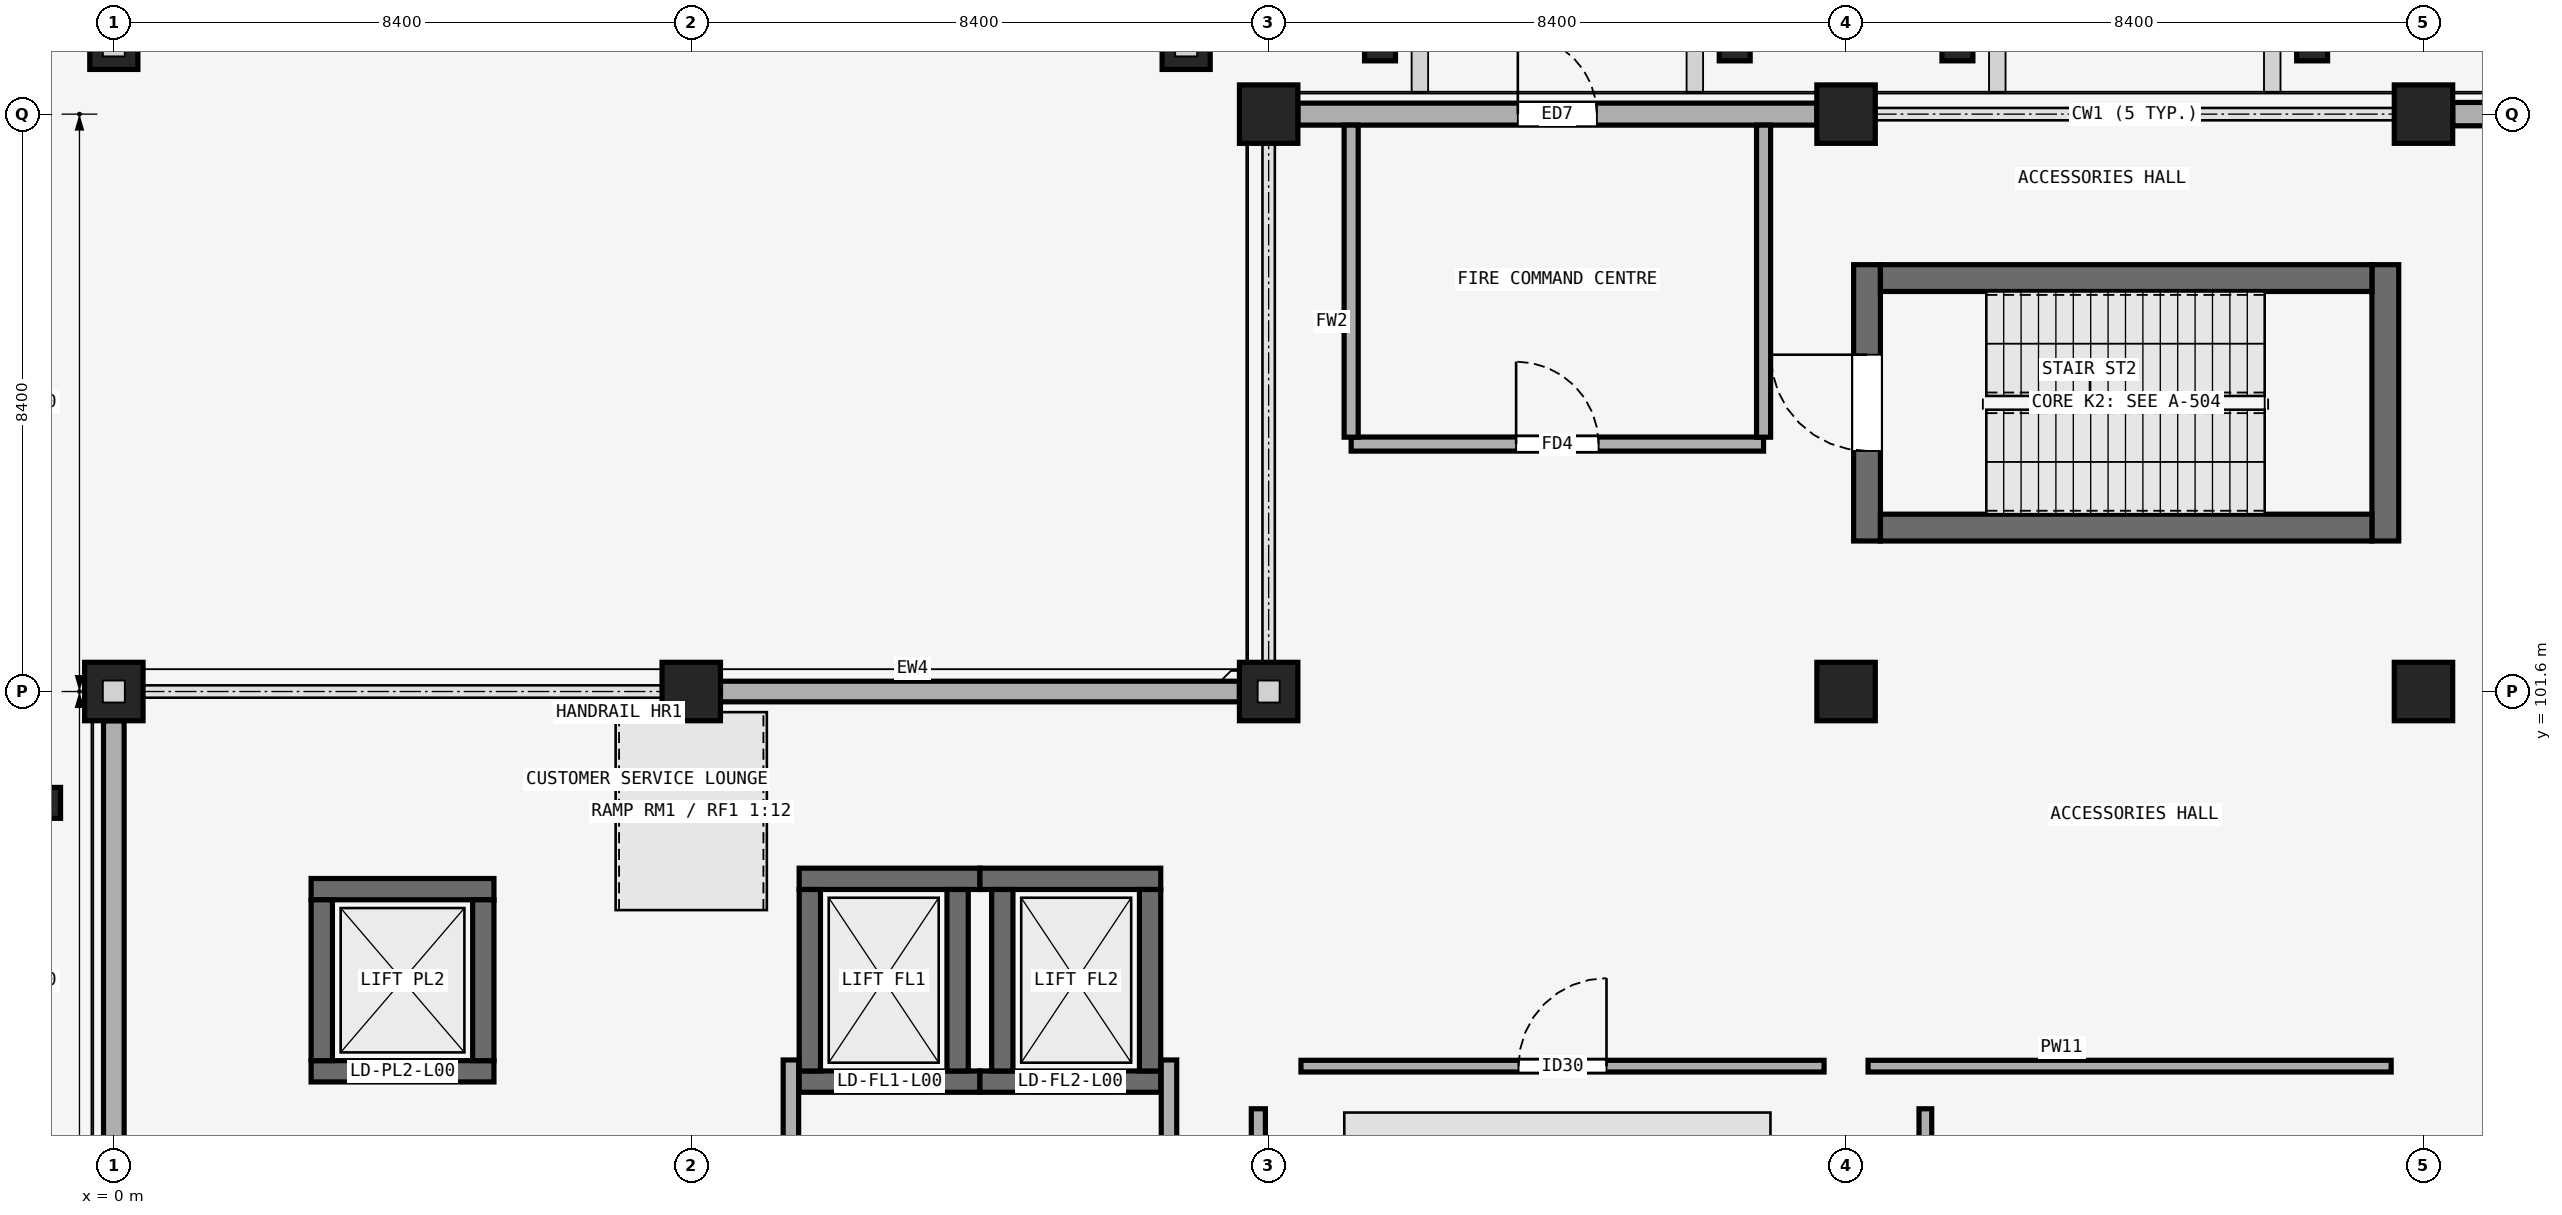
"""IFC4 building model, lengths in metres.
Left out: names, types, materials, properties, quantities, classifications, styles, units other than length and angle.
Written with IfcOpenShell. Run it as: python <this file> out.ifc"""

import sys

from ifc_helpers import new_model, si_unit, direction, frame, frame_2d, origin, origin_2d, place, context, subcontext, project, spatial, rectangle, circle, extrude, element, fill, save


model = new_model("IFC4")
c1 = context("Model", 3, precision=1e-05, world=origin(), true_north=direction((0.0, 1.0)))
c2 = subcontext(c1, "Body", "Model", "MODEL_VIEW")
j1 = project(units=[si_unit("LENGTHUNIT", "METRE"), si_unit("PLANEANGLEUNIT", "RADIAN")], contexts=[c1])
p1 = place(None, origin())
s1 = spatial("IfcSite", under=j1, at=p1, CompositionType="ELEMENT")
p2 = place(p1, origin())
s2 = spatial("IfcBuilding", under=s1, at=p2, CompositionType="ELEMENT")
p3 = place(p2, origin())
s3 = spatial("IfcBuildingStorey", under=s2, at=p3, CompositionType="ELEMENT", Elevation=0.0)
for number, where, z_axis, x_axis in (
    (1, (0.0, 101.6, 0.0), (0.0, 0.0, 1.0), (1.0, 0.0, 0.0)),
    (2, (8.4, 101.6, 0.0), (0.0, 0.0, 1.0), (1.0, 0.0, 0.0)),
    (3, (16.8, 101.6, 0.0), (0.0, 0.0, 1.0), (1.0, 0.0, 0.0)),
    (4, (25.2, 101.6, 0.0), (0.0, 0.0, 1.0), (1.0, 0.0, 0.0)),
    (5, (33.6, 101.6, 0.0), (0.0, 0.0, 1.0), (1.0, 0.0, 0.0)),
    (6, (16.8, 110.0, 0.0), (0.0, 0.0, 1.0), (1.0, 0.0, 0.0)),
    (7, (25.2, 110.0, 0.0), (0.0, 0.0, 1.0), (1.0, 0.0, 0.0)),
    (8, (33.6, 110.0, 0.0), (0.0, 0.0, 1.0), (1.0, 0.0, 0.0)),
):
    element("IfcColumn", number, at=place(p3, frame(where, z_axis=z_axis, x_axis=x_axis)), inside=s3, PredefinedType="COLUMN", context=c2, shape_type="SweptSolid", body=[
        extrude(rectangle(XDim=0.85, YDim=0.85, at=origin_2d()), origin(), (0.0, 0.0, 1.0), 5.4),
    ])
for number, where, z_axis, x_axis in (
    (9, (0.0, 111.0, 0.0), (0.0, 0.0, 1.0), (1.0, 0.0, 0.0)),
    (10, (15.6, 111.0, 0.0), (0.0, 0.0, 1.0), (1.0, 0.0, 0.0)),
):
    element("IfcColumn", number, at=place(p3, frame(where, z_axis=z_axis, x_axis=x_axis)), inside=s3, PredefinedType="COLUMN", context=c2, shape_type="SweptSolid", body=[
        extrude(circle(Radius=0.35, at=origin_2d()), origin(), (0.0, 0.0, 1.0), 4.55),
    ])
for number, where, z_axis, x_axis in (
    (11, (18.42, 111.05, 0.0), (0.0, 0.0, 1.0), (1.0, 0.0, 0.0)),
    (12, (23.58, 111.05, 0.0), (0.0, 0.0, 1.0), (1.0, 0.0, 0.0)),
    (13, (26.82, 111.05, 0.0), (0.0, 0.0, 1.0), (1.0, 0.0, 0.0)),
    (14, (31.98, 111.05, 0.0), (0.0, 0.0, 1.0), (1.0, 0.0, 0.0)),
    (15, (-1.05, 99.98, 0.0), (0.0, 0.0, 1.0), (0.0, 1.0, 0.0)),
):
    element("IfcColumn", number, at=place(p3, frame(where, z_axis=z_axis, x_axis=x_axis)), inside=s3, PredefinedType="PILASTER", context=c2, shape_type="SweptSolid", body=[
        extrude(rectangle(XDim=0.45, YDim=0.55, at=origin_2d()), origin(), (0.0, 0.0, 1.0), 5.4),
    ])
p4 = place(p3, frame((8.825, 101.6, 0.0), z_axis=(0.0, 0.0, 1.0), x_axis=(1.0, 0.0, 0.0)))
e16 = element("IfcWall", 16, at=p4, inside=s3, PredefinedType="SOLIDWALL", context=c2, shape_type="SweptSolid", body=[
    extrude(rectangle(XDim=7.55, YDim=0.3, at=frame_2d((3.775, 0.0))), origin(), (0.0, 0.0, 1.0), 4.35),
])
p5 = place(p3, frame((17.225, 110.0, 0.0), z_axis=(0.0, 0.0, 1.0), x_axis=(1.0, 0.0, 0.0)))
e17 = element("IfcWall", 17, at=p5, inside=s3, PredefinedType="SOLIDWALL", context=c2, shape_type="SweptSolid", body=[
    extrude(rectangle(XDim=7.55, YDim=0.32, at=frame_2d((3.775, 0.0))), origin(), (0.0, 0.0, 1.0), 4.35),
])
p6 = place(p5, frame((3.2, 0.0, 0.0)))
e18 = element("IfcOpeningElement", 18, at=p6, cuts=e17, PredefinedType="OPENING", context=c2, shape_type="SweptSolid", body=[
    extrude(rectangle(XDim=1.15, YDim=2.15, at=frame_2d((0.575, 1.075))), frame((0.0, 0.17, 0.0), z_axis=(0.0, -1.0, 0.0), x_axis=(1.0, 0.0, 0.0)), (0.0, 0.0, 1.0), 0.34),
])
p7 = place(p3, frame((34.025, 110.0, 0.0), z_axis=(0.0, 0.0, 1.0), x_axis=(1.0, 0.0, 0.0)))
e19 = element("IfcWall", 19, at=p7, inside=s3, PredefinedType="SOLIDWALL", context=c2, shape_type="SweptSolid", body=[
    extrude(rectangle(XDim=7.55, YDim=0.34, at=frame_2d((3.775, 0.0))), origin(), (0.0, 0.0, 1.0), 4.35),
])
p8 = place(p7, frame((2.775, 0.0, 0.0)))
e20 = element("IfcOpeningElement", 20, at=p8, cuts=e19, PredefinedType="OPENING", context=c2, shape_type="SweptSolid", body=[
    extrude(rectangle(XDim=2.0, YDim=2.5, at=frame_2d((1.0, 1.25))), frame((0.0, 0.18, 0.0), z_axis=(0.0, -1.0, 0.0), x_axis=(1.0, 0.0, 0.0)), (0.0, 0.0, 1.0), 0.36),
])
p9 = place(p3, frame((0.0, 93.625, 0.0), z_axis=(0.0, 0.0, 1.0), x_axis=(0.0, 1.0, 0.0)))
e21 = element("IfcWall", 21, at=p9, inside=s3, PredefinedType="SOLIDWALL", context=c2, shape_type="SweptSolid", body=[
    extrude(rectangle(XDim=7.55, YDim=0.3, at=frame_2d((3.775, 0.0))), origin(), (0.0, 0.0, 1.0), 4.35),
])
p10 = place(p3, frame((25.505, 103.79, 0.0), z_axis=(0.0, 0.0, 1.0), x_axis=(0.0, 1.0, 0.0)))
e22 = element("IfcWall", 22, at=p10, inside=s3, PredefinedType="SHEAR", context=c2, shape_type="SweptSolid", body=[
    extrude(rectangle(XDim=4.02, YDim=0.39, at=frame_2d((2.01, 0.0))), origin(), (0.0, 0.0, 1.0), 5.1),
])
p11 = place(p10, frame((1.31, 0.0, 0.0)))
e23 = element("IfcOpeningElement", 23, at=p11, cuts=e22, PredefinedType="OPENING", context=c2, shape_type="SweptSolid", body=[
    extrude(rectangle(XDim=1.4, YDim=2.15, at=frame_2d((0.7, 1.075))), frame((0.0, 0.205, 0.0), z_axis=(0.0, -1.0, 0.0), x_axis=(1.0, 0.0, 0.0)), (0.0, 0.0, 1.0), 0.41),
])
p12 = place(p3, frame((33.045, 103.79, 0.0), z_axis=(0.0, 0.0, 1.0), x_axis=(0.0, 1.0, 0.0)))
e24 = element("IfcWall", 24, at=p12, inside=s3, PredefinedType="SHEAR", context=c2, shape_type="SweptSolid", body=[
    extrude(rectangle(XDim=4.02, YDim=0.39, at=frame_2d((2.01, 0.0))), origin(), (0.0, 0.0, 1.0), 5.1),
])
for number, where, z_axis, x_axis in (
    (25, (25.7, 103.985, 0.0), (0.0, 0.0, 1.0), (1.0, 0.0, 0.0)),
    (26, (25.7, 107.615, 0.0), (0.0, 0.0, 1.0), (1.0, 0.0, 0.0)),
):
    element("IfcWall", number, at=place(p3, frame(where, z_axis=z_axis, x_axis=x_axis)), inside=s3, PredefinedType="SHEAR", context=c2, shape_type="SweptSolid", body=[
        extrude(rectangle(XDim=7.15, YDim=0.39, at=frame_2d((3.575, 0.0))), origin(), (0.0, 0.0, 1.0), 5.1),
    ])
p13 = place(p3, frame((9.97, 95.925, 0.0), z_axis=(0.0, 0.0, 1.0), x_axis=(1.0, 0.0, 0.0)))
e27 = element("IfcWall", 27, at=p13, inside=s3, PredefinedType="SHEAR", context=c2, shape_type="SweptSolid", body=[
    extrude(rectangle(XDim=2.63, YDim=0.31, at=frame_2d((1.315, 0.0))), origin(), (0.0, 0.0, 1.0), 5.1),
])
p14 = place(p13, frame((0.715, 0.0, 0.0)))
e28 = element("IfcOpeningElement", 28, at=p14, cuts=e27, PredefinedType="OPENING", context=c2, shape_type="SweptSolid", body=[
    extrude(rectangle(XDim=1.2, YDim=2.25, at=frame_2d((0.6, 1.125))), frame((0.0, 0.165, 0.0), z_axis=(0.0, -1.0, 0.0), x_axis=(1.0, 0.0, 0.0)), (0.0, 0.0, 1.0), 0.33),
])
p15 = place(p3, frame((9.97, 98.875, 0.0), z_axis=(0.0, 0.0, 1.0), x_axis=(1.0, 0.0, 0.0)))
e29 = element("IfcWall", 29, at=p15, inside=s3, PredefinedType="SHEAR", context=c2, shape_type="SweptSolid", body=[
    extrude(rectangle(XDim=2.63, YDim=0.31, at=frame_2d((1.315, 0.0))), origin(), (0.0, 0.0, 1.0), 5.1),
])
for number, where, z_axis, x_axis in (
    (30, (10.125, 96.08, 0.0), (0.0, 0.0, 1.0), (0.0, 1.0, 0.0)),
    (31, (12.275, 96.08, 0.0), (0.0, 0.0, 1.0), (0.0, 1.0, 0.0)),
):
    element("IfcWall", number, at=place(p3, frame(where, z_axis=z_axis, x_axis=x_axis)), inside=s3, PredefinedType="SHEAR", context=c2, shape_type="SweptSolid", body=[
        extrude(rectangle(XDim=2.64, YDim=0.31, at=frame_2d((1.32, 0.0))), origin(), (0.0, 0.0, 1.0), 5.1),
    ])
p16 = place(p3, frame((12.6, 95.925, 0.0), z_axis=(0.0, 0.0, 1.0), x_axis=(1.0, 0.0, 0.0)))
e32 = element("IfcWall", 32, at=p16, inside=s3, PredefinedType="SHEAR", context=c2, shape_type="SweptSolid", body=[
    extrude(rectangle(XDim=2.63, YDim=0.31, at=frame_2d((1.315, 0.0))), origin(), (0.0, 0.0, 1.0), 5.1),
])
p17 = place(p16, frame((0.715, 0.0, 0.0)))
e33 = element("IfcOpeningElement", 33, at=p17, cuts=e32, PredefinedType="OPENING", context=c2, shape_type="SweptSolid", body=[
    extrude(rectangle(XDim=1.2, YDim=2.25, at=frame_2d((0.6, 1.125))), frame((0.0, 0.165, 0.0), z_axis=(0.0, -1.0, 0.0), x_axis=(1.0, 0.0, 0.0)), (0.0, 0.0, 1.0), 0.33),
])
p18 = place(p3, frame((12.6, 98.875, 0.0), z_axis=(0.0, 0.0, 1.0), x_axis=(1.0, 0.0, 0.0)))
e34 = element("IfcWall", 34, at=p18, inside=s3, PredefinedType="SHEAR", context=c2, shape_type="SweptSolid", body=[
    extrude(rectangle(XDim=2.63, YDim=0.31, at=frame_2d((1.315, 0.0))), origin(), (0.0, 0.0, 1.0), 5.1),
])
for number, where, z_axis, x_axis in (
    (35, (12.925, 96.08, 0.0), (0.0, 0.0, 1.0), (0.0, 1.0, 0.0)),
    (36, (15.075, 96.08, 0.0), (0.0, 0.0, 1.0), (0.0, 1.0, 0.0)),
):
    element("IfcWall", number, at=place(p3, frame(where, z_axis=z_axis, x_axis=x_axis)), inside=s3, PredefinedType="SHEAR", context=c2, shape_type="SweptSolid", body=[
        extrude(rectangle(XDim=2.64, YDim=0.31, at=frame_2d((1.32, 0.0))), origin(), (0.0, 0.0, 1.0), 5.1),
    ])
p19 = place(p3, frame((2.87, 96.075, 0.0), z_axis=(0.0, 0.0, 1.0), x_axis=(1.0, 0.0, 0.0)))
e37 = element("IfcWall", 37, at=p19, inside=s3, PredefinedType="SHEAR", context=c2, shape_type="SweptSolid", body=[
    extrude(rectangle(XDim=2.66, YDim=0.31, at=frame_2d((1.33, 0.0))), origin(), (0.0, 0.0, 1.0), 5.1),
])
p20 = place(p19, frame((0.78, 0.0, 0.0)))
e38 = element("IfcOpeningElement", 38, at=p20, cuts=e37, PredefinedType="OPENING", context=c2, shape_type="SweptSolid", body=[
    extrude(rectangle(XDim=1.1, YDim=2.2, at=frame_2d((0.55, 1.1))), frame((0.0, 0.165, 0.0), z_axis=(0.0, -1.0, 0.0), x_axis=(1.0, 0.0, 0.0)), (0.0, 0.0, 1.0), 0.33),
])
p21 = place(p3, frame((2.87, 98.725, 0.0), z_axis=(0.0, 0.0, 1.0), x_axis=(1.0, 0.0, 0.0)))
e39 = element("IfcWall", 39, at=p21, inside=s3, PredefinedType="SHEAR", context=c2, shape_type="SweptSolid", body=[
    extrude(rectangle(XDim=2.66, YDim=0.31, at=frame_2d((1.33, 0.0))), origin(), (0.0, 0.0, 1.0), 5.1),
])
for number, where, z_axis, x_axis in (
    (40, (3.025, 96.23, 0.0), (0.0, 0.0, 1.0), (0.0, 1.0, 0.0)),
    (41, (5.375, 96.23, 0.0), (0.0, 0.0, 1.0), (0.0, 1.0, 0.0)),
):
    element("IfcWall", number, at=place(p3, frame(where, z_axis=z_axis, x_axis=x_axis)), inside=s3, PredefinedType="SHEAR", context=c2, shape_type="SweptSolid", body=[
        extrude(rectangle(XDim=2.34, YDim=0.31, at=frame_2d((1.17, 0.0))), origin(), (0.0, 0.0, 1.0), 5.1),
    ])
for number, where, z_axis, x_axis in (
    (42, (9.85, 91.71, 0.0), (0.0, 0.0, 1.0), (0.0, 1.0, 0.0)),
    (43, (15.35, 91.71, 0.0), (0.0, 0.0, 1.0), (0.0, 1.0, 0.0)),
):
    element("IfcWall", number, at=place(p3, frame(where, z_axis=z_axis, x_axis=x_axis)), inside=s3, PredefinedType="PARTITIONING", context=c2, shape_type="SweptSolid", body=[
        extrude(rectangle(XDim=4.53, YDim=0.225, at=frame_2d((2.265, 0.0))), origin(), (0.0, 0.0, 1.0), 4.4),
    ])
p22 = place(p3, frame((18.0, 105.2, 0.0), z_axis=(0.0, 0.0, 1.0), x_axis=(1.0, 0.0, 0.0)))
e44 = element("IfcWall", 44, at=p22, inside=s3, PredefinedType="PARTITIONING", context=c2, shape_type="SweptSolid", body=[
    extrude(rectangle(XDim=6.0, YDim=0.205, at=frame_2d((3.0, 0.0))), origin(), (0.0, 0.0, 1.0), 5.1),
])
p23 = place(p22, frame((2.4, 0.0, 0.0)))
e45 = element("IfcOpeningElement", 45, at=p23, cuts=e44, PredefinedType="OPENING", context=c2, shape_type="SweptSolid", body=[
    extrude(rectangle(XDim=1.2, YDim=2.2, at=frame_2d((0.6, 1.1))), frame((0.0, 0.113, 0.0), z_axis=(0.0, -1.0, 0.0), x_axis=(1.0, 0.0, 0.0)), (0.0, 0.0, 1.0), 0.225),
])
for number, where, z_axis, x_axis in (
    (46, (18.0, 105.3, 0.0), (0.0, 0.0, 1.0), (0.0, 1.0, 0.0)),
    (47, (24.0, 105.3, 0.0), (0.0, 0.0, 1.0), (0.0, 1.0, 0.0)),
):
    element("IfcWall", number, at=place(p3, frame(where, z_axis=z_axis, x_axis=x_axis)), inside=s3, PredefinedType="PARTITIONING", context=c2, shape_type="SweptSolid", body=[
        extrude(rectangle(XDim=4.54, YDim=0.205, at=frame_2d((2.27, 0.0))), origin(), (0.0, 0.0, 1.0), 4.35),
    ])
p24 = place(p3, frame((16.65, 83.67, 0.0), z_axis=(0.0, 0.0, 1.0), x_axis=(0.0, 1.0, 0.0)))
e48 = element("IfcWall", 48, at=p24, inside=s3, PredefinedType="PARTITIONING", context=c2, shape_type="SweptSolid", body=[
    extrude(rectangle(XDim=11.86, YDim=0.205, at=frame_2d((5.93, 0.0))), origin(), (0.0, 0.0, 1.0), 4.35),
])
p25 = place(p24, frame((5.34, 0.0, 0.0)))
e49 = element("IfcOpeningElement", 49, at=p25, cuts=e48, PredefinedType="OPENING", context=c2, shape_type="SweptSolid", body=[
    extrude(rectangle(XDim=1.18, YDim=2.22, at=frame_2d((0.59, 1.11))), frame((0.0, 0.113, 0.0), z_axis=(0.0, -1.0, 0.0), x_axis=(1.0, 0.0, 0.0)), (0.0, 0.0, 1.0), 0.225),
])
p26 = place(p3, frame((26.354, 89.72, 0.0), z_axis=(0.0, 0.0, 1.0), x_axis=(0.0, 1.0, 0.0)))
e50 = element("IfcWall", 50, at=p26, inside=s3, PredefinedType="PARTITIONING", context=c2, shape_type="SweptSolid", body=[
    extrude(rectangle(XDim=5.81, YDim=0.185, at=frame_2d((2.905, 0.0))), origin(), (0.0, 0.0, 1.0), 4.4),
])
p27 = place(p3, frame((17.27, 96.15, 0.0), z_axis=(0.0, 0.0, 1.0), x_axis=(1.0, 0.0, 0.0)))
e51 = element("IfcWall", 51, at=p27, inside=s3, PredefinedType="PARTITIONING", context=c2, shape_type="SweptSolid", body=[
    extrude(rectangle(XDim=7.61, YDim=0.17, at=frame_2d((3.805, 0.0))), origin(), (0.0, 0.0, 1.0), 5.1),
])
p28 = place(p27, frame((3.165, 0.0, 0.0)))
e52 = element("IfcOpeningElement", 52, at=p28, cuts=e51, PredefinedType="OPENING", context=c2, shape_type="SweptSolid", body=[
    extrude(rectangle(XDim=1.28, YDim=2.46, at=frame_2d((0.64, 1.23))), frame((0.0, 0.095, 0.0), z_axis=(0.0, -1.0, 0.0), x_axis=(1.0, 0.0, 0.0)), (0.0, 0.0, 1.0), 0.19),
])
p29 = place(p3, frame((25.52, 96.15, 0.0), z_axis=(0.0, 0.0, 1.0), x_axis=(1.0, 0.0, 0.0)))
e53 = element("IfcWall", 53, at=p29, inside=s3, PredefinedType="PARTITIONING", context=c2, shape_type="SweptSolid", body=[
    extrude(rectangle(XDim=7.61, YDim=0.17, at=frame_2d((3.805, 0.0))), origin(), (0.0, 0.0, 1.0), 5.1),
])
p30 = place(p6, origin())
e54 = element("IfcDoor", 54, at=p30, inside=s3, OperationType="SINGLE_SWING_LEFT", PredefinedType="DOOR", context=c2, shape_type="SweptSolid", body=[
    extrude(rectangle(XDim=1.15, YDim=2.15, at=frame_2d((0.575, 1.075))), frame((0.0, 0.025, 0.0), z_axis=(0.0, -1.0, 0.0), x_axis=(1.0, 0.0, 0.0)), (0.0, 0.0, 1.0), 0.05),
])
fill(e18, e54)
p31 = place(p11, origin())
e55 = element("IfcDoor", 55, at=p31, inside=s3, OperationType="SINGLE_SWING_RIGHT", PredefinedType="DOOR", context=c2, shape_type="SweptSolid", body=[
    extrude(rectangle(XDim=1.4, YDim=2.15, at=frame_2d((0.7, 1.075))), frame((0.0, 0.025, 0.0), z_axis=(0.0, -1.0, 0.0), x_axis=(1.0, 0.0, 0.0)), (0.0, 0.0, 1.0), 0.05),
])
fill(e23, e55)
p32 = place(p14, origin())
e56 = element("IfcDoor", 56, at=p32, inside=s3, OperationType="SLIDING_TO_LEFT", PredefinedType="DOOR", context=c2, shape_type="SweptSolid", body=[
    extrude(rectangle(XDim=1.2, YDim=2.25, at=frame_2d((0.6, 1.125))), frame((0.0, 0.025, 0.0), z_axis=(0.0, -1.0, 0.0), x_axis=(1.0, 0.0, 0.0)), (0.0, 0.0, 1.0), 0.05),
])
fill(e28, e56)
p33 = place(p17, origin())
e57 = element("IfcDoor", 57, at=p33, inside=s3, OperationType="SLIDING_TO_LEFT", PredefinedType="DOOR", context=c2, shape_type="SweptSolid", body=[
    extrude(rectangle(XDim=1.2, YDim=2.25, at=frame_2d((0.6, 1.125))), frame((0.0, 0.025, 0.0), z_axis=(0.0, -1.0, 0.0), x_axis=(1.0, 0.0, 0.0)), (0.0, 0.0, 1.0), 0.05),
])
fill(e33, e57)
p34 = place(p20, origin())
e58 = element("IfcDoor", 58, at=p34, inside=s3, OperationType="SLIDING_TO_LEFT", PredefinedType="DOOR", context=c2, shape_type="SweptSolid", body=[
    extrude(rectangle(XDim=1.1, YDim=2.2, at=frame_2d((0.55, 1.1))), frame((0.0, 0.025, 0.0), z_axis=(0.0, -1.0, 0.0), x_axis=(1.0, 0.0, 0.0)), (0.0, 0.0, 1.0), 0.05),
])
fill(e38, e58)
p35 = place(p23, origin())
e59 = element("IfcDoor", 59, at=p35, inside=s3, OperationType="SINGLE_SWING_LEFT", PredefinedType="DOOR", context=c2, shape_type="SweptSolid", body=[
    extrude(rectangle(XDim=1.2, YDim=2.2, at=frame_2d((0.6, 1.1))), frame((0.0, 0.025, 0.0), z_axis=(0.0, -1.0, 0.0), x_axis=(1.0, 0.0, 0.0)), (0.0, 0.0, 1.0), 0.05),
])
fill(e45, e59)
p36 = place(p28, origin())
e60 = element("IfcDoor", 60, at=p36, inside=s3, OperationType="SINGLE_SWING_RIGHT", PredefinedType="DOOR", context=c2, shape_type="SweptSolid", body=[
    extrude(rectangle(XDim=1.28, YDim=2.46, at=frame_2d((0.64, 1.23))), frame((0.0, 0.025, 0.0), z_axis=(0.0, -1.0, 0.0), x_axis=(1.0, 0.0, 0.0)), (0.0, 0.0, 1.0), 0.05),
])
fill(e52, e60)
save(model, sys.argv[1])
